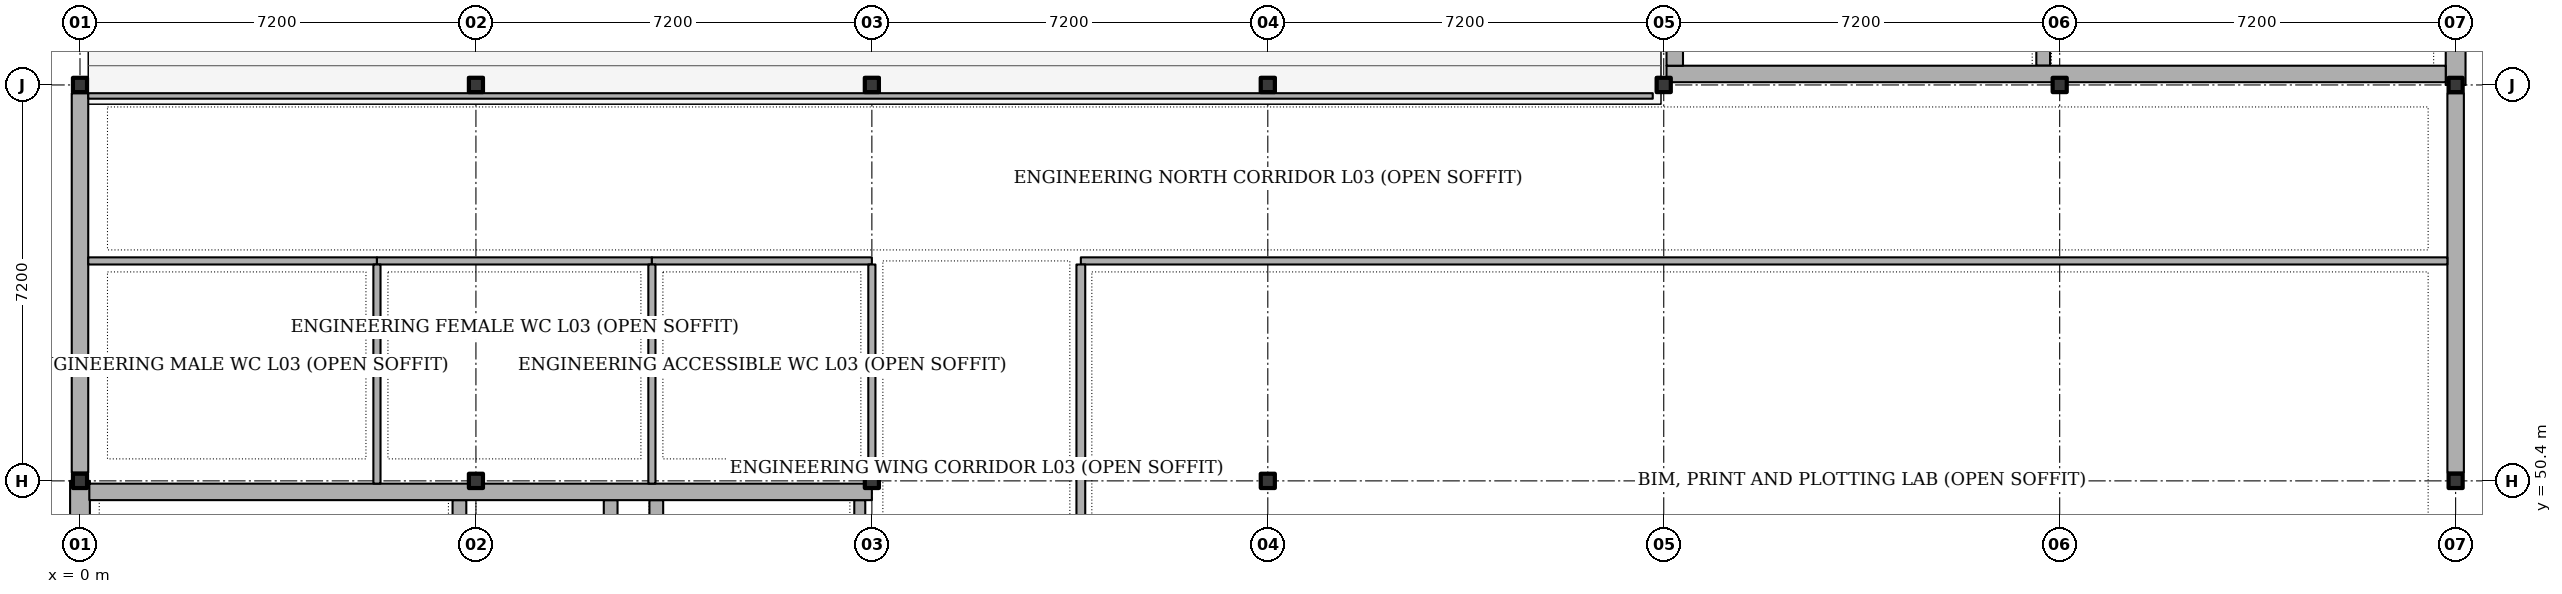
"""IFC4 building model, lengths in metres.
Left out: names, types, materials, properties, quantities, classifications, styles, units other than length and angle.
Written with IfcOpenShell. Run it as: python <this file> out.ifc"""

import sys

from ifc_helpers import new_model, si_unit, direction, frame, frame_2d, origin, origin_2d, place, context, subcontext, project, spatial, rectangle, i_section, extrude, element, fill, save


model = new_model("IFC4")
c1 = context("Model", 3, precision=1e-05, world=origin(), true_north=direction((0.0, 1.0)))
c2 = subcontext(c1, "Body", "Model", "MODEL_VIEW")
j1 = project(units=[si_unit("LENGTHUNIT", "METRE"), si_unit("PLANEANGLEUNIT", "RADIAN")], contexts=[c1])
p1 = place(None, origin())
s1 = spatial("IfcSite", under=j1, at=p1, CompositionType="ELEMENT")
p2 = place(p1, origin())
s2 = spatial("IfcBuilding", under=s1, at=p2, CompositionType="ELEMENT")
p3 = place(p2, frame((0.0, 0.0, 14.4)))
s3 = spatial("IfcBuildingStorey", under=s2, at=p3, CompositionType="ELEMENT", Elevation=14.4)
for number, where, z_axis, x_axis in (
    (1, (0.0, 50.4, 0.0), (0.0, 0.0, 1.0), (1.0, 0.0, 0.0)),
    (2, (0.0, 57.6, 0.0), (0.0, 0.0, 1.0), (1.0, 0.0, 0.0)),
    (3, (7.2, 50.4, 0.0), (0.0, 0.0, 1.0), (1.0, 0.0, 0.0)),
    (4, (7.2, 57.6, 0.0), (0.0, 0.0, 1.0), (1.0, 0.0, 0.0)),
    (5, (14.4, 50.4, 0.0), (0.0, 0.0, 1.0), (1.0, 0.0, 0.0)),
    (6, (14.4, 57.6, 0.0), (0.0, 0.0, 1.0), (1.0, 0.0, 0.0)),
    (7, (21.6, 50.4, 0.0), (0.0, 0.0, 1.0), (1.0, 0.0, 0.0)),
    (8, (21.6, 57.6, 0.0), (0.0, 0.0, 1.0), (1.0, 0.0, 0.0)),
    (9, (28.8, 50.4, 0.0), (0.0, 0.0, 1.0), (1.0, 0.0, 0.0)),
    (10, (28.8, 57.6, 0.0), (0.0, 0.0, 1.0), (1.0, 0.0, 0.0)),
    (11, (36.0, 50.4, 0.0), (0.0, 0.0, 1.0), (1.0, 0.0, 0.0)),
    (12, (36.0, 57.6, 0.0), (0.0, 0.0, 1.0), (1.0, 0.0, 0.0)),
    (13, (43.2, 50.4, 0.0), (0.0, 0.0, 1.0), (1.0, 0.0, 0.0)),
    (14, (43.2, 57.6, 0.0), (0.0, 0.0, 1.0), (1.0, 0.0, 0.0)),
):
    element("IfcColumn", number, at=place(p3, frame(where, z_axis=z_axis, x_axis=x_axis)), inside=s3, PredefinedType="COLUMN", context=c2, shape_type="SweptSolid", body=[
        extrude(i_section(OverallWidth=0.256, OverallDepth=0.26, WebThickness=0.01, FlangeThickness=0.017, FilletRadius=0.013, at=origin_2d()), origin(), (0.0, 0.0, 1.0), 4.5),
    ])
p4 = place(p3, frame((0.0, 43.2, 0.0), z_axis=(0.0, 0.0, 1.0), x_axis=(0.0, 1.0, 0.0)))
e15 = element("IfcWall", 15, at=p4, inside=s3, PredefinedType="SHEAR", context=c2, shape_type="SweptSolid", body=[
    extrude(rectangle(XDim=7.2, YDim=0.36, at=frame_2d((3.6, 0.0))), origin(), (0.0, 0.0, 1.0), 3.85),
])
p5 = place(p3, frame((0.0, 50.55, 0.0), z_axis=(0.0, 0.0, 1.0), x_axis=(0.0, 1.0, 0.0)))
e16 = element("IfcWall", 16, at=p5, inside=s3, PredefinedType="SOLIDWALL", context=c2, shape_type="SweptSolid", body=[
    extrude(rectangle(XDim=6.9, YDim=0.3, at=frame_2d((3.45, 0.0))), origin(), (0.0, 0.0, 1.0), 3.85),
])
p6 = place(p5, frame((1.6, 0.0, 1.05)))
e17 = element("IfcOpeningElement", 17, at=p6, cuts=e16, PredefinedType="OPENING", context=c2, shape_type="SweptSolid", body=[
    extrude(rectangle(XDim=0.8, YDim=1.4, at=frame_2d((0.4, 0.7))), frame((0.0, 0.16, 0.0), z_axis=(0.0, -1.0, 0.0), x_axis=(1.0, 0.0, 0.0)), (0.0, 0.0, 1.0), 0.32),
])
p7 = place(p3, frame((43.2, 64.8, 0.0), z_axis=(0.0, 0.0, 1.0), x_axis=(0.0, -1.0, 0.0)))
e18 = element("IfcWall", 18, at=p7, inside=s3, PredefinedType="SHEAR", context=c2, shape_type="SweptSolid", body=[
    extrude(rectangle(XDim=7.2, YDim=0.36, at=frame_2d((3.6, 0.0))), origin(), (0.0, 0.0, 1.0), 3.503),
])
p8 = place(p7, frame((3.0, 0.0, 0.0)))
e19 = element("IfcOpeningElement", 19, at=p8, cuts=e18, PredefinedType="OPENING", context=c2, shape_type="SweptSolid", body=[
    extrude(rectangle(XDim=1.2, YDim=2.15, at=frame_2d((0.6, 1.075))), frame((0.0, 0.19, 0.0), z_axis=(0.0, -1.0, 0.0), x_axis=(1.0, 0.0, 0.0)), (0.0, 0.0, 1.0), 0.38),
])
p9 = place(p3, frame((43.2, 57.45, 0.0), z_axis=(0.0, 0.0, 1.0), x_axis=(0.0, -1.0, 0.0)))
e20 = element("IfcWall", 20, at=p9, inside=s3, PredefinedType="SOLIDWALL", context=c2, shape_type="SweptSolid", body=[
    extrude(rectangle(XDim=6.9, YDim=0.3, at=frame_2d((3.45, 0.0))), origin(), (0.0, 0.0, 1.0), 3.503),
])
p10 = place(p9, frame((4.07, 0.0, 1.05)))
e21 = element("IfcOpeningElement", 21, at=p10, cuts=e20, PredefinedType="OPENING", context=c2, shape_type="SweptSolid", body=[
    extrude(rectangle(XDim=1.66, YDim=1.8, at=frame_2d((0.83, 0.9))), frame((0.0, 0.16, 0.0), z_axis=(0.0, -1.0, 0.0), x_axis=(1.0, 0.0, 0.0)), (0.0, 0.0, 1.0), 0.32),
])
p11 = place(p3, frame((6.9, 43.55, 0.0), z_axis=(0.0, 0.0, 1.0), x_axis=(0.0, 1.0, 0.0)))
e22 = element("IfcWall", 22, at=p11, inside=s3, PredefinedType="SHEAR", context=c2, shape_type="SweptSolid", body=[
    extrude(rectangle(XDim=6.5, YDim=0.25, at=frame_2d((3.25, 0.0))), origin(), (0.0, 0.0, 1.0), 3.6),
])
p12 = place(p11, frame((0.95, 0.0, 0.0)))
e23 = element("IfcOpeningElement", 23, at=p12, cuts=e22, PredefinedType="OPENING", context=c2, shape_type="SweptSolid", body=[
    extrude(rectangle(XDim=1.35, YDim=2.15, at=frame_2d((0.675, 1.075))), frame((0.0, 0.135, 0.0), z_axis=(0.0, -1.0, 0.0), x_axis=(1.0, 0.0, 0.0)), (0.0, 0.0, 1.0), 0.27),
])
p13 = place(p3, frame((9.65, 47.085, 0.0), z_axis=(0.0, 0.0, 1.0), x_axis=(0.0, 1.0, 0.0)))
e24 = element("IfcWall", 24, at=p13, inside=s3, PredefinedType="SHEAR", context=c2, shape_type="SweptSolid", body=[
    extrude(rectangle(XDim=2.965, YDim=0.25, at=frame_2d((1.482, 0.0))), origin(), (0.0, 0.0, 1.0), 3.6),
])
p14 = place(p3, frame((10.48, 47.085, 0.0), z_axis=(0.0, 0.0, 1.0), x_axis=(0.0, 1.0, 0.0)))
e25 = element("IfcWall", 25, at=p14, inside=s3, PredefinedType="SHEAR", context=c2, shape_type="SweptSolid", body=[
    extrude(rectangle(XDim=2.965, YDim=0.25, at=frame_2d((1.482, 0.0))), origin(), (0.0, 0.0, 1.0), 3.6),
])
p15 = place(p14, frame((0.9, 0.0, 0.0)))
e26 = element("IfcOpeningElement", 26, at=p15, cuts=e25, PredefinedType="OPENING", context=c2, shape_type="SweptSolid", body=[
    extrude(rectangle(XDim=0.92, YDim=2.05, at=frame_2d((0.46, 1.025))), frame((0.0, 0.135, 0.0), z_axis=(0.0, -1.0, 0.0), x_axis=(1.0, 0.0, 0.0)), (0.0, 0.0, 1.0), 0.27),
])
p16 = place(p3, frame((14.18, 43.55, 0.0), z_axis=(0.0, 0.0, 1.0), x_axis=(0.0, 1.0, 0.0)))
e27 = element("IfcWall", 27, at=p16, inside=s3, PredefinedType="SOLIDWALL", context=c2, shape_type="SweptSolid", body=[
    extrude(rectangle(XDim=6.5, YDim=0.2, at=frame_2d((3.25, 0.0))), origin(), (0.0, 0.0, 1.0), 3.6),
])
p17 = place(p16, frame((2.5, 0.0, 0.0)))
e28 = element("IfcOpeningElement", 28, at=p17, cuts=e27, PredefinedType="OPENING", context=c2, shape_type="SweptSolid", body=[
    extrude(rectangle(XDim=1.5, YDim=2.15, at=frame_2d((0.75, 1.075))), frame((0.0, 0.11, 0.0), z_axis=(0.0, -1.0, 0.0), x_axis=(1.0, 0.0, 0.0)), (0.0, 0.0, 1.0), 0.22),
])
p18 = place(p3, frame((0.17, 50.2, 0.0), z_axis=(0.0, 0.0, 1.0), x_axis=(1.0, 0.0, 0.0)))
e29 = element("IfcWall", 29, at=p18, inside=s3, PredefinedType="SHEAR", context=c2, shape_type="SweptSolid", body=[
    extrude(rectangle(XDim=14.23, YDim=0.3, at=frame_2d((7.115, 0.0))), origin(), (0.0, 0.0, 1.0), 3.6),
])
p19 = place(p3, frame((35.7, 57.95, 0.0), z_axis=(0.0, 0.0, 1.0), x_axis=(0.0, 1.0, 0.0)))
e30 = element("IfcWall", 30, at=p19, inside=s3, PredefinedType="SHEAR", context=c2, shape_type="SweptSolid", body=[
    extrude(rectangle(XDim=6.67, YDim=0.25, at=frame_2d((3.335, 0.0))), origin(), (0.0, 0.0, 1.0), 3.6),
])
p20 = place(p19, frame((0.95, 0.0, 0.0)))
e31 = element("IfcOpeningElement", 31, at=p20, cuts=e30, PredefinedType="OPENING", context=c2, shape_type="SweptSolid", body=[
    extrude(rectangle(XDim=1.35, YDim=2.15, at=frame_2d((0.675, 1.075))), frame((0.0, 0.135, 0.0), z_axis=(0.0, -1.0, 0.0), x_axis=(1.0, 0.0, 0.0)), (0.0, 0.0, 1.0), 0.27),
])
p21 = place(p3, frame((28.85, 57.8, 0.0), z_axis=(0.0, 0.0, 1.0), x_axis=(1.0, 0.0, 0.0)))
e32 = element("IfcWall", 32, at=p21, inside=s3, PredefinedType="SHEAR", context=c2, shape_type="SweptSolid", body=[
    extrude(rectangle(XDim=14.17, YDim=0.3, at=frame_2d((7.085, 0.0))), origin(), (0.0, 0.0, 1.0), 3.6),
])
p22 = place(p21, frame((11.5, 0.0, 0.0)))
e33 = element("IfcOpeningElement", 33, at=p22, cuts=e32, PredefinedType="OPENING", context=c2, shape_type="SweptSolid", body=[
    extrude(rectangle(XDim=1.5, YDim=2.15, at=frame_2d((0.75, 1.075))), frame((0.0, 0.16, 0.0), z_axis=(0.0, -1.0, 0.0), x_axis=(1.0, 0.0, 0.0)), (0.0, 0.0, 1.0), 0.32),
])
p23 = place(p3, frame((29.0, 57.95, 0.0), z_axis=(0.0, 0.0, 1.0), x_axis=(0.0, 1.0, 0.0)))
e34 = element("IfcWall", 34, at=p23, inside=s3, PredefinedType="SHEAR", context=c2, shape_type="SweptSolid", body=[
    extrude(rectangle(XDim=6.67, YDim=0.3, at=frame_2d((3.335, 0.0))), origin(), (0.0, 0.0, 1.0), 3.6),
])
p24 = place(p3, frame((18.2, 54.4, 0.0), z_axis=(0.0, 0.0, 1.0), x_axis=(1.0, 0.0, 0.0)))
e35 = element("IfcWall", 35, at=p24, inside=s3, PredefinedType="PARTITIONING", context=c2, shape_type="SweptSolid", body=[
    extrude(rectangle(XDim=24.85, YDim=0.13, at=frame_2d((12.425, 0.0))), origin(), (0.0, 0.0, 1.0), 3.55),
])
p25 = place(p24, frame((5.897, 0.0, 0.0)))
e36 = element("IfcOpeningElement", 36, at=p25, cuts=e35, PredefinedType="OPENING", context=c2, shape_type="SweptSolid", body=[
    extrude(rectangle(XDim=1.75, YDim=2.25, at=frame_2d((0.875, 1.125))), frame((0.0, 0.075, 0.0), z_axis=(0.0, -1.0, 0.0), x_axis=(1.0, 0.0, 0.0)), (0.0, 0.0, 1.0), 0.15),
])
p26 = place(p3, frame((0.15, 57.4, 0.0), z_axis=(0.0, 0.0, 1.0), x_axis=(1.0, 0.0, 0.0)))
e37 = element("IfcWall", 37, at=p26, inside=s3, PredefinedType="PARTITIONING", context=c2, shape_type="SweptSolid", body=[
    extrude(rectangle(XDim=28.45, YDim=0.1, at=frame_2d((14.225, 0.0))), origin(), (0.0, 0.0, 1.0), 3.55),
])
p27 = place(p26, frame((16.757, 0.0, 0.0)))
e38 = element("IfcOpeningElement", 38, at=p27, cuts=e37, PredefinedType="OPENING", context=c2, shape_type="SweptSolid", body=[
    extrude(rectangle(XDim=1.6, YDim=2.2, at=frame_2d((0.8, 1.1))), frame((0.0, 0.06, 0.0), z_axis=(0.0, -1.0, 0.0), x_axis=(1.0, 0.0, 0.0)), (0.0, 0.0, 1.0), 0.12),
])
p28 = place(p3, frame((0.15, 54.4, 0.0), z_axis=(0.0, 0.0, 1.0), x_axis=(1.0, 0.0, 0.0)))
e39 = element("IfcWall", 39, at=p28, inside=s3, PredefinedType="PARTITIONING", context=c2, shape_type="SweptSolid", body=[
    extrude(rectangle(XDim=5.25, YDim=0.13, at=frame_2d((2.625, 0.0))), origin(), (0.0, 0.0, 1.0), 3.55),
])
p29 = place(p28, frame((3.14, 0.0, 0.0)))
e40 = element("IfcOpeningElement", 40, at=p29, cuts=e39, PredefinedType="OPENING", context=c2, shape_type="SweptSolid", body=[
    extrude(rectangle(XDim=0.9, YDim=2.05, at=frame_2d((0.45, 1.025))), frame((0.0, 0.075, 0.0), z_axis=(0.0, -1.0, 0.0), x_axis=(1.0, 0.0, 0.0)), (0.0, 0.0, 1.0), 0.15),
])
p30 = place(p3, frame((5.4, 54.4, 0.0), z_axis=(0.0, 0.0, 1.0), x_axis=(1.0, 0.0, 0.0)))
e41 = element("IfcWall", 41, at=p30, inside=s3, PredefinedType="PARTITIONING", context=c2, shape_type="SweptSolid", body=[
    extrude(rectangle(XDim=5.0, YDim=0.13, at=frame_2d((2.5, 0.0))), origin(), (0.0, 0.0, 1.0), 3.55),
])
p31 = place(p30, frame((3.78, 0.0, 0.0)))
e42 = element("IfcOpeningElement", 42, at=p31, cuts=e41, PredefinedType="OPENING", context=c2, shape_type="SweptSolid", body=[
    extrude(rectangle(XDim=0.9, YDim=2.05, at=frame_2d((0.45, 1.025))), frame((0.0, 0.075, 0.0), z_axis=(0.0, -1.0, 0.0), x_axis=(1.0, 0.0, 0.0)), (0.0, 0.0, 1.0), 0.15),
])
p32 = place(p3, frame((10.4, 54.4, 0.0), z_axis=(0.0, 0.0, 1.0), x_axis=(1.0, 0.0, 0.0)))
e43 = element("IfcWall", 43, at=p32, inside=s3, PredefinedType="PARTITIONING", context=c2, shape_type="SweptSolid", body=[
    extrude(rectangle(XDim=4.0, YDim=0.13, at=frame_2d((2.0, 0.0))), origin(), (0.0, 0.0, 1.0), 3.55),
])
p33 = place(p32, frame((0.32, 0.0, 0.0)))
e44 = element("IfcOpeningElement", 44, at=p33, cuts=e43, PredefinedType="OPENING", context=c2, shape_type="SweptSolid", body=[
    extrude(rectangle(XDim=0.98, YDim=2.1, at=frame_2d((0.49, 1.05))), frame((0.0, 0.075, 0.0), z_axis=(0.0, -1.0, 0.0), x_axis=(1.0, 0.0, 0.0)), (0.0, 0.0, 1.0), 0.15),
])
p34 = place(p3, frame((18.2, 44.28, 0.0), z_axis=(0.0, 0.0, 1.0), x_axis=(0.0, 1.0, 0.0)))
e45 = element("IfcWall", 45, at=p34, inside=s3, PredefinedType="PARTITIONING", context=c2, shape_type="SweptSolid", body=[
    extrude(rectangle(XDim=10.055, YDim=0.16, at=frame_2d((5.027, 0.0))), origin(), (0.0, 0.0, 1.0), 3.55),
])
for number, where, z_axis, x_axis in (
    (46, (5.4, 50.35, 0.0), (0.0, 0.0, 1.0), (0.0, 1.0, 0.0)),
    (47, (10.4, 50.35, 0.0), (0.0, 0.0, 1.0), (0.0, 1.0, 0.0)),
):
    element("IfcWall", number, at=place(p3, frame(where, z_axis=z_axis, x_axis=x_axis)), inside=s3, PredefinedType="PARTITIONING", context=c2, shape_type="SweptSolid", body=[
        extrude(rectangle(XDim=3.985, YDim=0.13, at=frame_2d((1.992, 0.0))), origin(), (0.0, 0.0, 1.0), 3.55),
    ])
p35 = place(p3, frame((14.4, 50.532, 0.0), z_axis=(0.0, 0.0, 1.0), x_axis=(0.0, 1.0, 0.0)))
e48 = element("IfcWall", 48, at=p35, inside=s3, PredefinedType="PARTITIONING", context=c2, shape_type="SweptSolid", body=[
    extrude(rectangle(XDim=3.803, YDim=0.13, at=frame_2d((1.901, 0.0))), origin(), (0.0, 0.0, 1.0), 3.55),
])
p36 = place(p6, origin())
e49 = element("IfcWindow", 49, at=p36, inside=s3, PartitioningType="SINGLE_PANEL", PredefinedType="WINDOW", context=c2, shape_type="SweptSolid", body=[
    extrude(rectangle(XDim=0.8, YDim=1.4, at=frame_2d((0.4, 0.7))), frame((0.0, 0.03, 0.0), z_axis=(0.0, -1.0, 0.0), x_axis=(1.0, 0.0, 0.0)), (0.0, 0.0, 1.0), 0.06),
])
fill(e17, e49)
p37 = place(p10, origin())
e50 = element("IfcWindow", 50, at=p37, inside=s3, PartitioningType="SINGLE_PANEL", PredefinedType="WINDOW", context=c2, shape_type="SweptSolid", body=[
    extrude(rectangle(XDim=1.66, YDim=1.8, at=frame_2d((0.83, 0.9))), frame((0.0, 0.03, 0.0), z_axis=(0.0, -1.0, 0.0), x_axis=(1.0, 0.0, 0.0)), (0.0, 0.0, 1.0), 0.06),
])
fill(e21, e50)
p38 = place(p22, origin())
e51 = element("IfcDoor", 51, at=p38, inside=s3, OperationType="SINGLE_SWING_LEFT", PredefinedType="DOOR", context=c2, shape_type="SweptSolid", body=[
    extrude(rectangle(XDim=1.5, YDim=2.15, at=frame_2d((0.75, 1.075))), frame((0.0, 0.025, 0.0), z_axis=(0.0, -1.0, 0.0), x_axis=(1.0, 0.0, 0.0)), (0.0, 0.0, 1.0), 0.05),
])
fill(e33, e51)
p39 = place(p25, origin())
e52 = element("IfcDoor", 52, at=p39, inside=s3, OperationType="DOUBLE_SWING_LEFT", PredefinedType="DOOR", context=c2, shape_type="SweptSolid", body=[
    extrude(rectangle(XDim=1.75, YDim=2.25, at=frame_2d((0.875, 1.125))), frame((0.0, 0.025, 0.0), z_axis=(0.0, -1.0, 0.0), x_axis=(1.0, 0.0, 0.0)), (0.0, 0.0, 1.0), 0.05),
])
fill(e36, e52)
p40 = place(p27, origin())
e53 = element("IfcDoor", 53, at=p40, inside=s3, OperationType="DOUBLE_SWING_LEFT", PredefinedType="DOOR", context=c2, shape_type="SweptSolid", body=[
    extrude(rectangle(XDim=1.6, YDim=2.2, at=frame_2d((0.8, 1.1))), frame((0.0, 0.025, 0.0), z_axis=(0.0, -1.0, 0.0), x_axis=(1.0, 0.0, 0.0)), (0.0, 0.0, 1.0), 0.05),
])
fill(e38, e53)
p41 = place(p29, origin())
e54 = element("IfcDoor", 54, at=p41, inside=s3, OperationType="SINGLE_SWING_RIGHT", PredefinedType="DOOR", context=c2, shape_type="SweptSolid", body=[
    extrude(rectangle(XDim=0.9, YDim=2.05, at=frame_2d((0.45, 1.025))), frame((0.0, 0.025, 0.0), z_axis=(0.0, -1.0, 0.0), x_axis=(1.0, 0.0, 0.0)), (0.0, 0.0, 1.0), 0.05),
])
fill(e40, e54)
p42 = place(p31, origin())
e55 = element("IfcDoor", 55, at=p42, inside=s3, OperationType="SINGLE_SWING_LEFT", PredefinedType="DOOR", context=c2, shape_type="SweptSolid", body=[
    extrude(rectangle(XDim=0.9, YDim=2.05, at=frame_2d((0.45, 1.025))), frame((0.0, 0.025, 0.0), z_axis=(0.0, -1.0, 0.0), x_axis=(1.0, 0.0, 0.0)), (0.0, 0.0, 1.0), 0.05),
])
fill(e42, e55)
p43 = place(p33, origin())
e56 = element("IfcDoor", 56, at=p43, inside=s3, OperationType="SINGLE_SWING_RIGHT", PredefinedType="DOOR", context=c2, shape_type="SweptSolid", body=[
    extrude(rectangle(XDim=0.98, YDim=2.1, at=frame_2d((0.49, 1.05))), frame((0.0, 0.025, 0.0), z_axis=(0.0, -1.0, 0.0), x_axis=(1.0, 0.0, 0.0)), (0.0, 0.0, 1.0), 0.05),
])
fill(e44, e56)
save(model, sys.argv[1])
